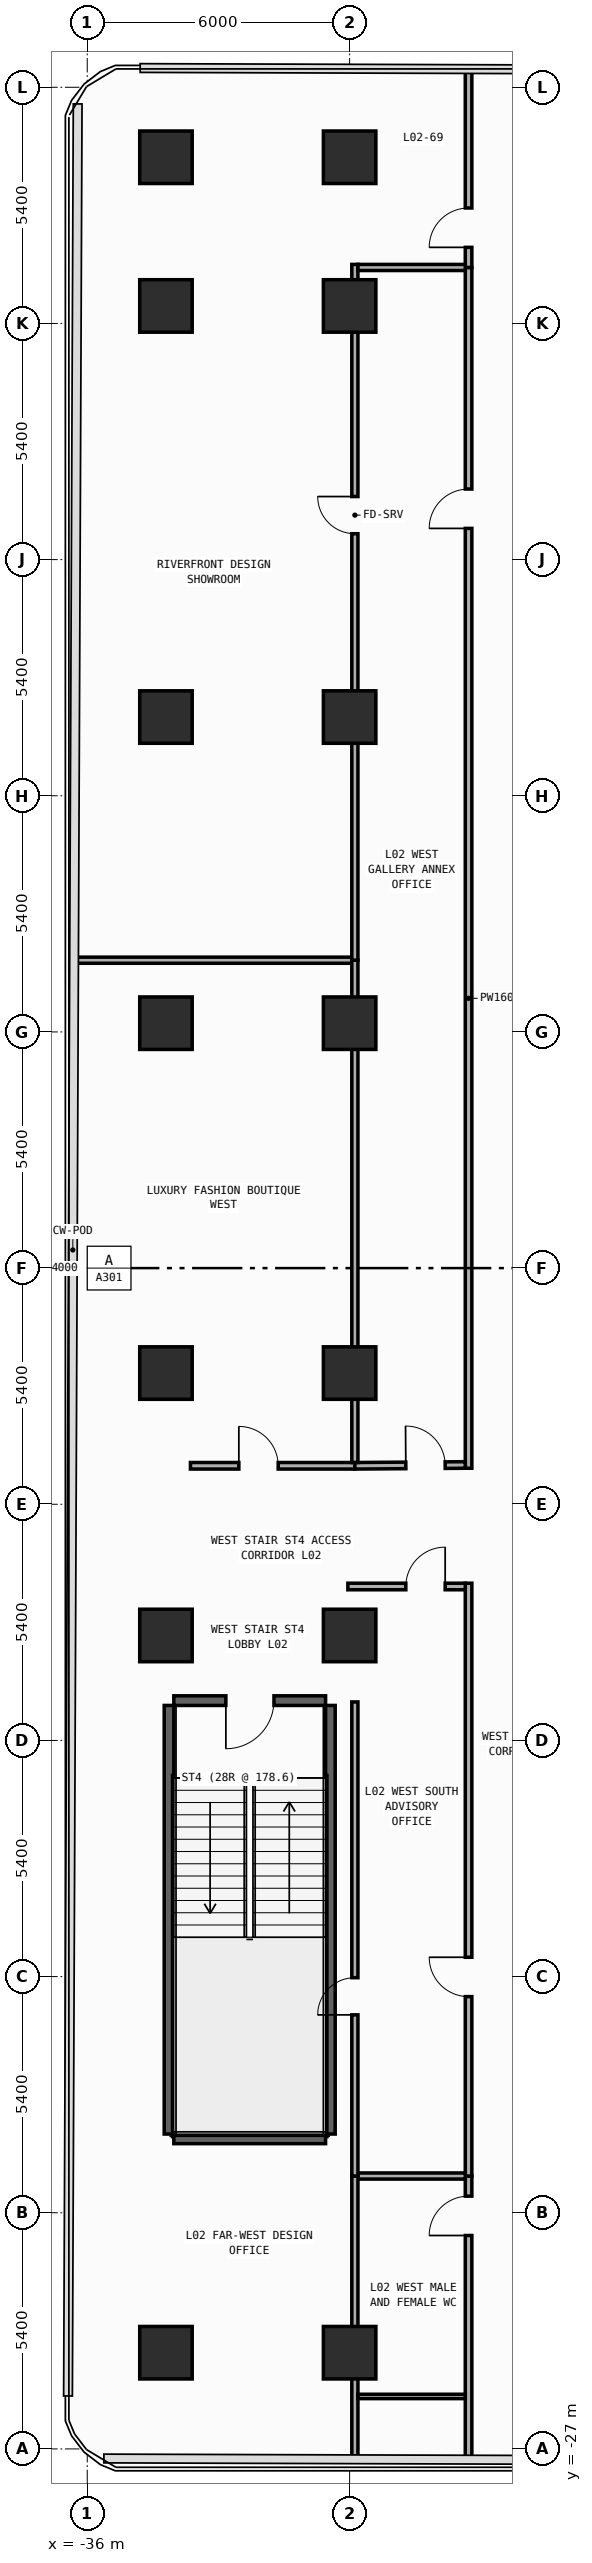
"""IFC4 building model, lengths in metres.
Left out: names, types, materials, properties, quantities, classifications, styles, units other than length and angle.
Written with IfcOpenShell. Run it as: python <this file> out.ifc"""

import sys

from ifc_helpers import new_model, si_unit, direction, frame, frame_2d, origin, origin_2d, place, context, subcontext, project, spatial, rectangle, extrude, element, fill, save


model = new_model("IFC4")
c1 = context("Model", 3, precision=1e-05, world=origin(), true_north=direction((0.0, 1.0)))
c2 = subcontext(c1, "Body", "Model", "MODEL_VIEW")
j1 = project(units=[si_unit("LENGTHUNIT", "METRE"), si_unit("PLANEANGLEUNIT", "RADIAN")], contexts=[c1])
p1 = place(None, origin())
s1 = spatial("IfcSite", under=j1, at=p1, CompositionType="ELEMENT")
p2 = place(p1, origin())
s2 = spatial("IfcBuilding", under=s1, at=p2, CompositionType="ELEMENT")
p3 = place(p2, frame((0.0, 0.0, 6.0)))
s3 = spatial("IfcBuildingStorey", under=s2, at=p3, CompositionType="ELEMENT", Elevation=6.0)
p4 = place(p3, frame((-30.55, -9.89, 0.0), z_axis=(0.0, 0.0, 1.0), x_axis=(-1.0, 0.0, 0.0)))
e1 = element("IfcWall", 1, at=p4, inside=s3, PredefinedType="SHEAR", context=c2, shape_type="SweptSolid", body=[
    extrude(rectangle(XDim=3.47, YDim=0.22, at=frame_2d((1.735, 0.0))), origin(), (0.0, 0.0, 1.0), 4.7),
])
p5 = place(p4, frame((1.18, 0.0, 0.0)))
e2 = element("IfcOpeningElement", 2, at=p5, cuts=e1, PredefinedType="OPENING", context=c2, shape_type="SweptSolid", body=[
    extrude(rectangle(XDim=1.1, YDim=2.2, at=frame_2d((0.55, 1.1))), frame((0.0, 0.12, 0.0), z_axis=(0.0, -1.0, 0.0), x_axis=(1.0, 0.0, 0.0)), (0.0, 0.0, 1.0), 0.24),
])
p6 = place(p3, frame((-34.02, -19.91, 0.0), z_axis=(0.0, 0.0, 1.0), x_axis=(1.0, 0.0, 0.0)))
e3 = element("IfcWall", 3, at=p6, inside=s3, PredefinedType="SHEAR", context=c2, shape_type="SweptSolid", body=[
    extrude(rectangle(XDim=3.47, YDim=0.22, at=frame_2d((1.735, 0.0))), origin(), (0.0, 0.0, 1.0), 4.7),
])
for number, where, z_axis, x_axis in (
    (4, (-34.13, -19.8, 0.0), (0.0, 0.0, 1.0), (0.0, 1.0, 0.0)),
    (5, (-30.44, -19.8, 0.0), (0.0, 0.0, 1.0), (0.0, 1.0, 0.0)),
):
    element("IfcWall", number, at=place(p3, frame(where, z_axis=z_axis, x_axis=x_axis)), inside=s3, PredefinedType="SHEAR", context=c2, shape_type="SweptSolid", body=[
        extrude(rectangle(XDim=9.8, YDim=0.22, at=frame_2d((4.9, 0.0))), origin(), (0.0, 0.0, 1.0), 4.7),
    ])
for number, where, z_axis, x_axis in (
    (6, (-34.2, -24.8, 0.0), (0.0, 0.0, 1.0), (1.0, 0.0, 0.0)),
    (7, (-34.2, -8.4, 0.0), (0.0, 0.0, 1.0), (1.0, 0.0, 0.0)),
    (8, (-34.2, -2.4, 0.0), (0.0, 0.0, 1.0), (1.0, 0.0, 0.0)),
    (9, (-34.2, 5.6, 0.0), (0.0, 0.0, 1.0), (1.0, 0.0, 0.0)),
    (10, (-34.2, 12.6, 0.0), (0.0, 0.0, 1.0), (1.0, 0.0, 0.0)),
    (11, (-34.2, 22.0, 0.0), (0.0, 0.0, 1.0), (1.0, 0.0, 0.0)),
    (12, (-34.2, 25.4, 0.0), (0.0, 0.0, 1.0), (1.0, 0.0, 0.0)),
    (13, (-30.0, -24.8, 0.0), (0.0, 0.0, 1.0), (1.0, 0.0, 0.0)),
    (14, (-30.0, -8.4, 0.0), (0.0, 0.0, 1.0), (1.0, 0.0, 0.0)),
    (15, (-30.0, -2.4, 0.0), (0.0, 0.0, 1.0), (1.0, 0.0, 0.0)),
    (16, (-30.0, 5.6, 0.0), (0.0, 0.0, 1.0), (1.0, 0.0, 0.0)),
    (17, (-30.0, 12.6, 0.0), (0.0, 0.0, 1.0), (1.0, 0.0, 0.0)),
    (18, (-30.0, 22.0, 0.0), (0.0, 0.0, 1.0), (1.0, 0.0, 0.0)),
    (19, (-30.0, 25.4, 0.0), (0.0, 0.0, 1.0), (1.0, 0.0, 0.0)),
):
    element("IfcColumn", number, at=place(p3, frame(where, z_axis=z_axis, x_axis=x_axis)), inside=s3, PredefinedType="COLUMN", context=c2, shape_type="SweptSolid", body=[
        extrude(rectangle(XDim=1.2, YDim=1.2, at=origin_2d()), origin(), (0.0, 0.0, 1.0), 5.0),
    ])
p7 = place(p3, frame((-27.28, -27.249, 0.0), z_axis=(0.0, 0.0, 1.0), x_axis=(0.0, 1.0, 0.0)))
e20 = element("IfcWall", 20, at=p7, inside=s3, PredefinedType="PARTITIONING", context=c2, shape_type="SweptSolid", body=[
    extrude(rectangle(XDim=6.489, YDim=0.15, at=frame_2d((3.245, 0.0))), origin(), (0.0, 0.0, 1.0), 4.7),
])
p8 = place(p7, frame((5.129, 0.0, 0.0)))
e21 = element("IfcOpeningElement", 21, at=p8, cuts=e20, PredefinedType="OPENING", context=c2, shape_type="SweptSolid", body=[
    extrude(rectangle(XDim=0.9, YDim=2.15, at=frame_2d((0.45, 1.075))), frame((0.0, 0.085, 0.0), z_axis=(0.0, -1.0, 0.0), x_axis=(1.0, 0.0, 0.0)), (0.0, 0.0, 1.0), 0.17),
])
p9 = place(p3, frame((-27.28, -20.76, 0.0), z_axis=(0.0, 0.0, 1.0), x_axis=(0.0, 1.0, 0.0)))
e22 = element("IfcWall", 22, at=p9, inside=s3, PredefinedType="PARTITIONING", context=c2, shape_type="SweptSolid", body=[
    extrude(rectangle(XDim=13.555, YDim=0.15, at=frame_2d((6.777, 0.0))), origin(), (0.0, 0.0, 1.0), 4.7),
])
p10 = place(p9, frame((4.102, 0.0, 0.0)))
e23 = element("IfcOpeningElement", 23, at=p10, cuts=e22, PredefinedType="OPENING", context=c2, shape_type="SweptSolid", body=[
    extrude(rectangle(XDim=0.9, YDim=2.15, at=frame_2d((0.45, 1.075))), frame((0.0, 0.085, 0.0), z_axis=(0.0, -1.0, 0.0), x_axis=(1.0, 0.0, 0.0)), (0.0, 0.0, 1.0), 0.17),
])
p11 = place(p3, frame((-27.28, -4.576, 0.0), z_axis=(0.0, 0.0, 1.0), x_axis=(0.0, 1.0, 0.0)))
e24 = element("IfcWall", 24, at=p11, inside=s3, PredefinedType="PARTITIONING", context=c2, shape_type="SweptSolid", body=[
    extrude(rectangle(XDim=27.456, YDim=0.15, at=frame_2d((13.728, 0.0))), origin(), (0.0, 0.0, 1.0), 4.7),
])
p12 = place(p11, frame((21.49, 0.0, 0.0)))
e25 = element("IfcOpeningElement", 25, at=p12, cuts=e24, PredefinedType="OPENING", context=c2, shape_type="SweptSolid", body=[
    extrude(rectangle(XDim=0.9, YDim=2.15, at=frame_2d((0.45, 1.075))), frame((0.0, 0.085, 0.0), z_axis=(0.0, -1.0, 0.0), x_axis=(1.0, 0.0, 0.0)), (0.0, 0.0, 1.0), 0.17),
])
p13 = place(p3, frame((-27.28, 22.88, 0.0), z_axis=(0.0, 0.0, 1.0), x_axis=(0.0, 1.0, 0.0)))
e26 = element("IfcWall", 26, at=p13, inside=s3, PredefinedType="PARTITIONING", context=c2, shape_type="SweptSolid", body=[
    extrude(rectangle(XDim=4.542, YDim=0.15, at=frame_2d((2.271, 0.0))), origin(), (0.0, 0.0, 1.0), 4.7),
])
p14 = place(p13, frame((0.46, 0.0, 0.0)))
e27 = element("IfcOpeningElement", 27, at=p14, cuts=e26, PredefinedType="OPENING", context=c2, shape_type="SweptSolid", body=[
    extrude(rectangle(XDim=0.9, YDim=2.15, at=frame_2d((0.45, 1.075))), frame((0.0, 0.085, 0.0), z_axis=(0.0, -1.0, 0.0), x_axis=(1.0, 0.0, 0.0)), (0.0, 0.0, 1.0), 0.17),
])
p15 = place(p3, frame((-33.64, -4.52, 0.0), z_axis=(0.0, 0.0, 1.0), x_axis=(1.0, 0.0, 0.0)))
e28 = element("IfcWall", 28, at=p15, inside=s3, PredefinedType="PARTITIONING", context=c2, shape_type="SweptSolid", body=[
    extrude(rectangle(XDim=3.76, YDim=0.15, at=frame_2d((1.88, 0.0))), origin(), (0.0, 0.0, 1.0), 4.7),
])
p16 = place(p15, frame((1.107, 0.0, 0.0)))
e29 = element("IfcOpeningElement", 29, at=p16, cuts=e28, PredefinedType="OPENING", context=c2, shape_type="SweptSolid", body=[
    extrude(rectangle(XDim=0.9, YDim=2.15, at=frame_2d((0.45, 1.075))), frame((0.0, 0.085, 0.0), z_axis=(0.0, -1.0, 0.0), x_axis=(1.0, 0.0, 0.0)), (0.0, 0.0, 1.0), 0.17),
])
p17 = place(p3, frame((-30.04, -7.28, 0.0), z_axis=(0.0, 0.0, 1.0), x_axis=(1.0, 0.0, 0.0)))
e30 = element("IfcWall", 30, at=p17, inside=s3, PredefinedType="PARTITIONING", context=c2, shape_type="SweptSolid", body=[
    extrude(rectangle(XDim=2.685, YDim=0.15, at=frame_2d((1.343, 0.0))), origin(), (0.0, 0.0, 1.0), 4.7),
])
p18 = place(p17, frame((1.325, 0.0, 0.0)))
e31 = element("IfcOpeningElement", 31, at=p18, cuts=e30, PredefinedType="OPENING", context=c2, shape_type="SweptSolid", body=[
    extrude(rectangle(XDim=0.9, YDim=2.15, at=frame_2d((0.45, 1.075))), frame((0.0, 0.085, 0.0), z_axis=(0.0, -1.0, 0.0), x_axis=(1.0, 0.0, 0.0)), (0.0, 0.0, 1.0), 0.17),
])
p19 = place(p3, frame((-29.88, -4.52, 0.0), z_axis=(0.0, 0.0, 1.0), x_axis=(0.999973705414, 0.007251791521, 0.0)))
e32 = element("IfcWall", 32, at=p19, inside=s3, PredefinedType="PARTITIONING", context=c2, shape_type="SweptSolid", body=[
    extrude(rectangle(XDim=2.525, YDim=0.15, at=frame_2d((1.262, 0.0))), origin(), (0.0, 0.0, 1.0), 4.7),
])
p20 = place(p19, frame((1.165, 0.0, 0.0)))
e33 = element("IfcOpeningElement", 33, at=p20, cuts=e32, PredefinedType="OPENING", context=c2, shape_type="SweptSolid", body=[
    extrude(rectangle(XDim=0.9, YDim=2.15, at=frame_2d((0.45, 1.075))), frame((0.0, 0.085, 0.0), z_axis=(0.0, -1.0, 0.0), x_axis=(1.0, 0.0, 0.0)), (0.0, 0.0, 1.0), 0.17),
])
p21 = place(p3, frame((-36.306, 7.04, 0.0), z_axis=(0.0, 0.0, 1.0), x_axis=(1.0, 0.0, 0.0)))
e34 = element("IfcWall", 34, at=p21, inside=s3, PredefinedType="PARTITIONING", context=c2, shape_type="SweptSolid", body=[
    extrude(rectangle(XDim=6.356, YDim=0.14, at=frame_2d((3.178, 0.0))), origin(), (0.0, 0.0, 1.0), 4.7),
])
p22 = place(p3, frame((-29.88, -4.445, 0.0), z_axis=(0.0, 0.0, 1.0), x_axis=(0.0, 1.0, 0.0)))
e35 = element("IfcWall", 35, at=p22, inside=s3, PredefinedType="PARTITIONING", context=c2, shape_type="SweptSolid", body=[
    extrude(rectangle(XDim=11.485, YDim=0.14, at=frame_2d((5.743, 0.0))), origin(), (0.0, 0.0, 1.0), 3.8),
])
p23 = place(p3, frame((-29.88, 7.04, 0.0), z_axis=(0.0, 0.0, 1.0), x_axis=(0.0, 1.0, 0.0)))
e36 = element("IfcWall", 36, at=p23, inside=s3, PredefinedType="PARTITIONING", context=c2, shape_type="SweptSolid", body=[
    extrude(rectangle(XDim=15.91, YDim=0.14, at=frame_2d((7.955, 0.0))), origin(), (0.0, 0.0, 1.0), 3.8),
])
p24 = place(p23, frame((9.752, 0.0, 0.0)))
e37 = element("IfcOpeningElement", 37, at=p24, cuts=e36, PredefinedType="OPENING", context=c2, shape_type="SweptSolid", body=[
    extrude(rectangle(XDim=0.85, YDim=2.1, at=frame_2d((0.425, 1.05))), frame((0.0, 0.08, 0.0), z_axis=(0.0, -1.0, 0.0), x_axis=(1.0, 0.0, 0.0)), (0.0, 0.0, 1.0), 0.16),
])
p25 = place(p3, frame((-29.81, -20.76, 0.0), z_axis=(0.0, 0.0, 1.0), x_axis=(1.0, 0.0, 0.0)))
e38 = element("IfcWall", 38, at=p25, inside=s3, PredefinedType="PARTITIONING", context=c2, shape_type="SweptSolid", body=[
    extrude(rectangle(XDim=2.455, YDim=0.14, at=frame_2d((1.228, 0.0))), origin(), (0.0, 0.0, 1.0), 4.7),
])
p26 = place(p3, frame((-29.88, -27.241, 0.0), z_axis=(0.0, 0.0, 1.0), x_axis=(0.0, 1.0, 0.0)))
e39 = element("IfcWall", 39, at=p26, inside=s3, PredefinedType="PARTITIONING", context=c2, shape_type="SweptSolid", body=[
    extrude(rectangle(XDim=6.481, YDim=0.14, at=frame_2d((3.24, 0.0))), origin(), (0.0, 0.0, 1.0), 4.7),
])
p27 = place(p3, frame((-29.88, -20.76, 0.0), z_axis=(0.0, 0.0, 1.0), x_axis=(0.0, 1.0, 0.0)))
e40 = element("IfcWall", 40, at=p27, inside=s3, PredefinedType="PARTITIONING", context=c2, shape_type="SweptSolid", body=[
    extrude(rectangle(XDim=10.84, YDim=0.14, at=frame_2d((5.42, 0.0))), origin(), (0.0, 0.0, 1.0), 4.7),
])
p28 = place(p27, frame((3.685, 0.0, 0.0)))
e41 = element("IfcOpeningElement", 41, at=p28, cuts=e40, PredefinedType="OPENING", context=c2, shape_type="SweptSolid", body=[
    extrude(rectangle(XDim=0.85, YDim=2.1, at=frame_2d((0.425, 1.05))), frame((0.0, 0.08, 0.0), z_axis=(0.0, -1.0, 0.0), x_axis=(1.0, 0.0, 0.0)), (0.0, 0.0, 1.0), 0.16),
])
p29 = place(p3, frame((-29.81, 22.88, 0.0), z_axis=(0.0, 0.0, 1.0), x_axis=(1.0, 0.0, 0.0)))
e42 = element("IfcWall", 42, at=p29, inside=s3, PredefinedType="PARTITIONING", context=c2, shape_type="SweptSolid", body=[
    extrude(rectangle(XDim=2.455, YDim=0.14, at=frame_2d((1.228, 0.0))), origin(), (0.0, 0.0, 1.0), 4.7),
])
p30 = place(p3, frame((-27.355, -25.8, 0.0), z_axis=(0.0, 0.0, 1.0), x_axis=(-1.0, 0.0, 0.0)))
e43 = element("IfcWall", 43, at=p30, inside=s3, PredefinedType="PARTITIONING", context=c2, shape_type="SweptSolid", body=[
    extrude(rectangle(XDim=2.455, YDim=0.1, at=frame_2d((1.228, 0.0))), origin(), (0.0, 0.0, 1.0), 4.7),
])
p31 = place(p5, origin())
e44 = element("IfcDoor", 44, at=p31, inside=s3, OperationType="SINGLE_SWING_RIGHT", PredefinedType="DOOR", context=c2, shape_type="SweptSolid", body=[
    extrude(rectangle(XDim=1.1, YDim=2.2, at=frame_2d((0.55, 1.1))), frame((0.0, 0.025, 0.0), z_axis=(0.0, -1.0, 0.0), x_axis=(1.0, 0.0, 0.0)), (0.0, 0.0, 1.0), 0.05),
])
fill(e2, e44)
p32 = place(p8, origin())
e45 = element("IfcDoor", 45, at=p32, inside=s3, OperationType="SINGLE_SWING_LEFT", PredefinedType="DOOR", context=c2, shape_type="SweptSolid", body=[
    extrude(rectangle(XDim=0.9, YDim=2.15, at=frame_2d((0.45, 1.075))), frame((0.0, 0.025, 0.0), z_axis=(0.0, -1.0, 0.0), x_axis=(1.0, 0.0, 0.0)), (0.0, 0.0, 1.0), 0.05),
])
fill(e21, e45)
p33 = place(p10, origin())
e46 = element("IfcDoor", 46, at=p33, inside=s3, OperationType="SINGLE_SWING_RIGHT", PredefinedType="DOOR", context=c2, shape_type="SweptSolid", body=[
    extrude(rectangle(XDim=0.9, YDim=2.15, at=frame_2d((0.45, 1.075))), frame((0.0, 0.025, 0.0), z_axis=(0.0, -1.0, 0.0), x_axis=(1.0, 0.0, 0.0)), (0.0, 0.0, 1.0), 0.05),
])
fill(e23, e46)
p34 = place(p12, origin())
e47 = element("IfcDoor", 47, at=p34, inside=s3, OperationType="SINGLE_SWING_LEFT", PredefinedType="DOOR", context=c2, shape_type="SweptSolid", body=[
    extrude(rectangle(XDim=0.9, YDim=2.15, at=frame_2d((0.45, 1.075))), frame((0.0, 0.025, 0.0), z_axis=(0.0, -1.0, 0.0), x_axis=(1.0, 0.0, 0.0)), (0.0, 0.0, 1.0), 0.05),
])
fill(e25, e47)
p35 = place(p14, origin())
e48 = element("IfcDoor", 48, at=p35, inside=s3, OperationType="SINGLE_SWING_LEFT", PredefinedType="DOOR", context=c2, shape_type="SweptSolid", body=[
    extrude(rectangle(XDim=0.9, YDim=2.15, at=frame_2d((0.45, 1.075))), frame((0.0, 0.025, 0.0), z_axis=(0.0, -1.0, 0.0), x_axis=(1.0, 0.0, 0.0)), (0.0, 0.0, 1.0), 0.05),
])
fill(e27, e48)
p36 = place(p16, origin())
e49 = element("IfcDoor", 49, at=p36, inside=s3, OperationType="SINGLE_SWING_LEFT", PredefinedType="DOOR", context=c2, shape_type="SweptSolid", body=[
    extrude(rectangle(XDim=0.9, YDim=2.15, at=frame_2d((0.45, 1.075))), frame((0.0, 0.025, 0.0), z_axis=(0.0, -1.0, 0.0), x_axis=(1.0, 0.0, 0.0)), (0.0, 0.0, 1.0), 0.05),
])
fill(e29, e49)
p37 = place(p18, origin())
e50 = element("IfcDoor", 50, at=p37, inside=s3, OperationType="SINGLE_SWING_RIGHT", PredefinedType="DOOR", context=c2, shape_type="SweptSolid", body=[
    extrude(rectangle(XDim=0.9, YDim=2.15, at=frame_2d((0.45, 1.075))), frame((0.0, 0.025, 0.0), z_axis=(0.0, -1.0, 0.0), x_axis=(1.0, 0.0, 0.0)), (0.0, 0.0, 1.0), 0.05),
])
fill(e31, e50)
p38 = place(p20, origin())
e51 = element("IfcDoor", 51, at=p38, inside=s3, OperationType="SINGLE_SWING_LEFT", PredefinedType="DOOR", context=c2, shape_type="SweptSolid", body=[
    extrude(rectangle(XDim=0.9, YDim=2.15, at=frame_2d((0.45, 1.075))), frame((0.0, 0.025, 0.0), z_axis=(0.0, -1.0, 0.0), x_axis=(1.0, 0.0, 0.0)), (0.0, 0.0, 1.0), 0.05),
])
fill(e33, e51)
p39 = place(p24, origin())
e52 = element("IfcDoor", 52, at=p39, inside=s3, OperationType="SINGLE_SWING_RIGHT", PredefinedType="DOOR", context=c2, shape_type="SweptSolid", body=[
    extrude(rectangle(XDim=0.85, YDim=2.1, at=frame_2d((0.425, 1.05))), frame((0.0, 0.025, 0.0), z_axis=(0.0, -1.0, 0.0), x_axis=(1.0, 0.0, 0.0)), (0.0, 0.0, 1.0), 0.05),
])
fill(e37, e52)
p40 = place(p28, origin())
e53 = element("IfcDoor", 53, at=p40, inside=s3, OperationType="SINGLE_SWING_LEFT", PredefinedType="DOOR", context=c2, shape_type="SweptSolid", body=[
    extrude(rectangle(XDim=0.85, YDim=2.1, at=frame_2d((0.425, 1.05))), frame((0.0, 0.025, 0.0), z_axis=(0.0, -1.0, 0.0), x_axis=(1.0, 0.0, 0.0)), (0.0, 0.0, 1.0), 0.05),
])
fill(e41, e53)
save(model, sys.argv[1])
